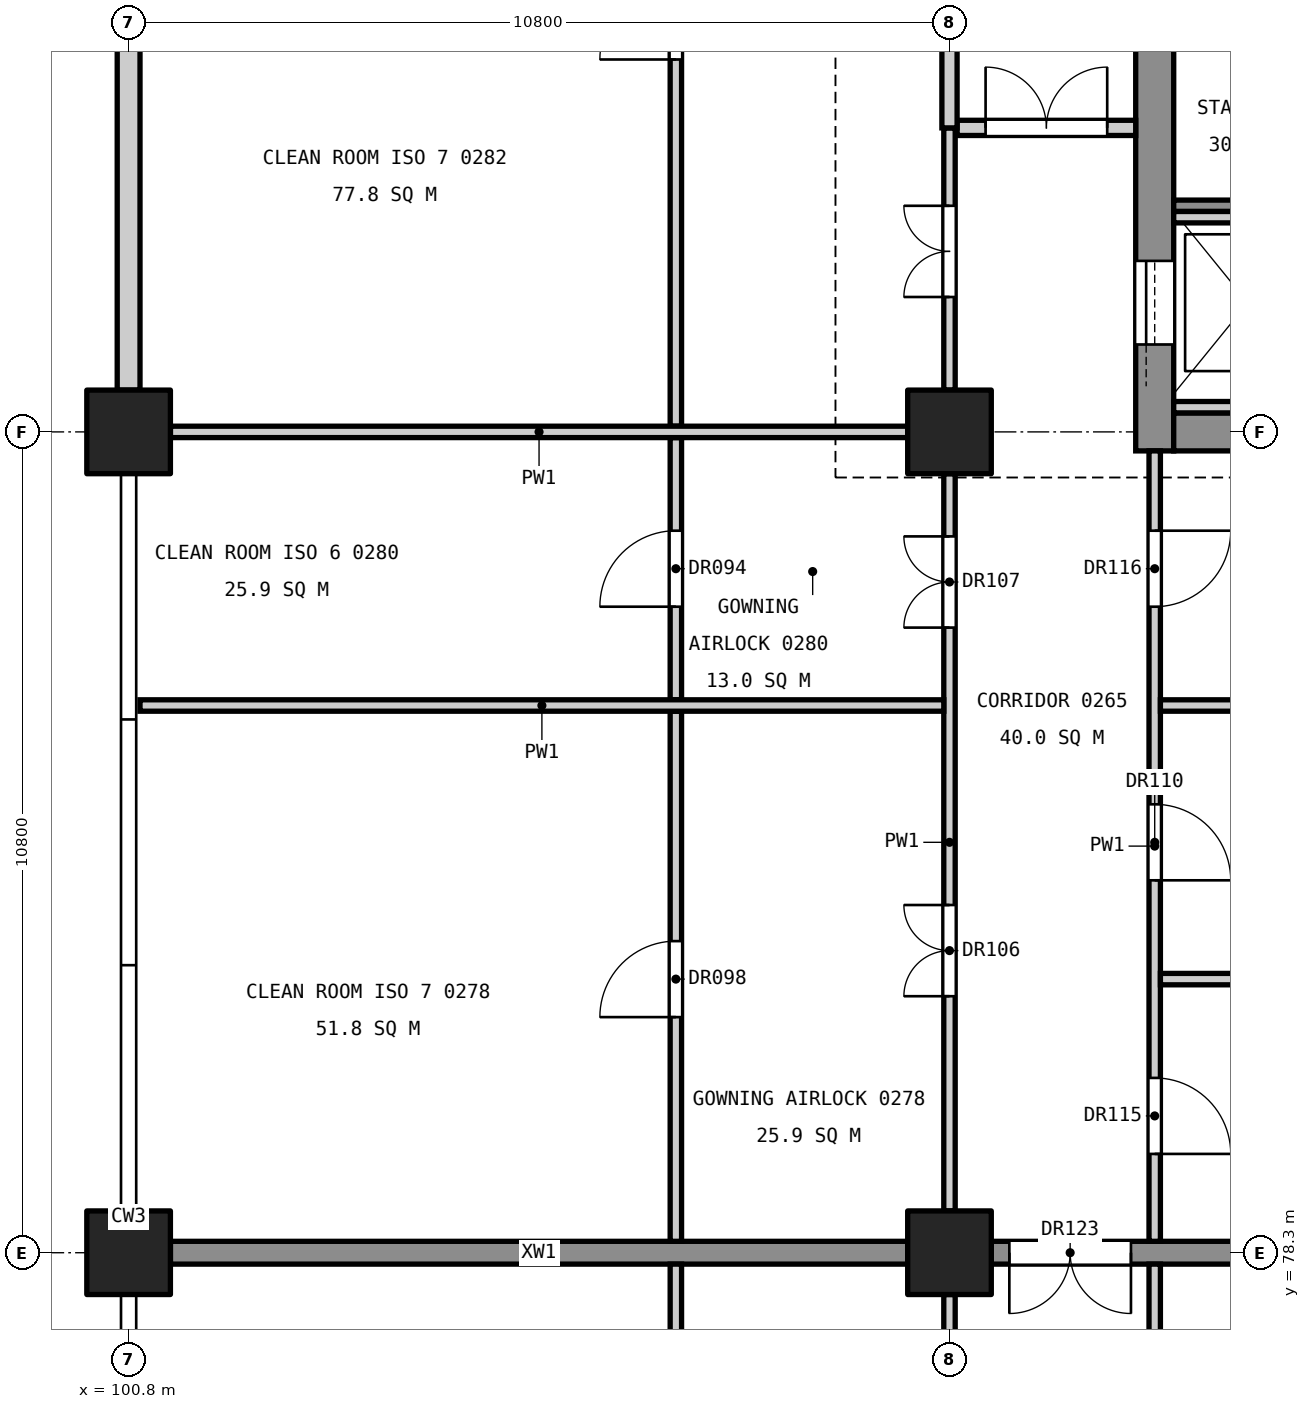
"""IFC4 building model, lengths in metres.
Left out: names, types, materials, properties, quantities, classifications, styles, units other than length and angle.
Written with IfcOpenShell. Run it as: python <this file> out.ifc"""

import sys

from ifc_helpers import new_model, si_unit, direction, frame, frame_2d, origin, origin_2d, place, context, subcontext, project, spatial, rectangle, extrude, element, fill, save


model = new_model("IFC4")
c1 = context("Model", 3, precision=1e-05, world=origin(), true_north=direction((0.0, 1.0)))
c2 = subcontext(c1, "Body", "Model", "MODEL_VIEW")
j1 = project(units=[si_unit("LENGTHUNIT", "METRE"), si_unit("PLANEANGLEUNIT", "RADIAN")], contexts=[c1])
p1 = place(None, origin())
s1 = spatial("IfcSite", under=j1, at=p1, CompositionType="ELEMENT")
p2 = place(p1, origin())
s2 = spatial("IfcBuilding", under=s1, at=p2, CompositionType="ELEMENT")
p3 = place(p2, frame((0.0, 0.0, 11.4)))
s3 = spatial("IfcBuildingStorey", under=s2, at=p3, CompositionType="ELEMENT", Elevation=11.4)
for number, where, z_axis, x_axis in (
    (1, (111.6, 78.3, 0.0), (0.0, 0.0, 1.0), (1.0, 0.0, 0.0)),
    (2, (111.6, 89.1, 0.0), (0.0, 0.0, 1.0), (1.0, 0.0, 0.0)),
    (3, (100.8, 78.3, 0.0), (0.0, 0.0, 1.0), (1.0, 0.0, 0.0)),
    (4, (100.8, 89.1, 0.0), (0.0, 0.0, 1.0), (1.0, 0.0, 0.0)),
):
    element("IfcColumn", number, at=place(p3, frame(where, z_axis=z_axis, x_axis=x_axis)), inside=s3, PredefinedType="COLUMN", context=c2, shape_type="SweptSolid", body=[
        extrude(rectangle(XDim=1.1, YDim=1.1, at=origin_2d()), origin(), (0.0, 0.0, 1.0), 5.4),
    ])
p4 = place(p3, frame((114.3, 88.85, 0.0), z_axis=(0.0, 0.0, 1.0), x_axis=(0.0, 1.0, 0.0)))
e5 = element("IfcWall", 5, at=p4, inside=s3, PredefinedType="SHEAR", context=c2, shape_type="SweptSolid", body=[
    extrude(rectangle(XDim=11.3, YDim=0.5, at=frame_2d((5.65, 0.0))), origin(), (0.0, 0.0, 1.0), 5.1),
])
p5 = place(p4, frame((9.35, 0.0, 0.0)))
e6 = element("IfcOpeningElement", 6, at=p5, cuts=e5, PredefinedType="OPENING", context=c2, shape_type="SweptSolid", body=[
    extrude(rectangle(XDim=1.4, YDim=2.1, at=frame_2d((0.7, 1.05))), frame((0.0, 0.26, 0.0), z_axis=(0.0, -1.0, 0.0), x_axis=(1.0, 0.0, 0.0)), (0.0, 0.0, 1.0), 0.52),
])
p6 = place(p4, frame((1.4, 0.0, 0.0)))
e7 = element("IfcOpeningElement", 7, at=p6, cuts=e5, PredefinedType="OPENING", context=c2, shape_type="SweptSolid", body=[
    extrude(rectangle(XDim=1.1, YDim=2.1, at=frame_2d((0.55, 1.05))), frame((0.0, 0.26, 0.0), z_axis=(0.0, -1.0, 0.0), x_axis=(1.0, 0.0, 0.0)), (0.0, 0.0, 1.0), 0.52),
])
p7 = place(p3, frame((118.55, 89.1, 0.0), z_axis=(0.0, 0.0, 1.0), x_axis=(-1.0, 0.0, 0.0)))
e8 = element("IfcWall", 8, at=p7, inside=s3, PredefinedType="SHEAR", context=c2, shape_type="SweptSolid", body=[
    extrude(rectangle(XDim=4.0, YDim=0.5, at=frame_2d((2.0, 0.0))), origin(), (0.0, 0.0, 1.0), 5.1),
])
p8 = place(p3, frame((118.25, 78.3, 0.0), z_axis=(0.0, 0.0, 1.0), x_axis=(-1.0, 0.0, 0.0)))
e9 = element("IfcWall", 9, at=p8, inside=s3, PredefinedType="SHEAR", context=c2, shape_type="SweptSolid", body=[
    extrude(rectangle(XDim=6.1, YDim=0.3, at=frame_2d((3.05, 0.0))), origin(), (0.0, 0.0, 1.0), 5.1),
])
p9 = place(p8, frame((4.262, 0.0, 0.0)))
e10 = element("IfcOpeningElement", 10, at=p9, cuts=e9, PredefinedType="OPENING", context=c2, shape_type="SweptSolid", body=[
    extrude(rectangle(XDim=1.6, YDim=2.1, at=frame_2d((0.8, 1.05))), frame((0.0, 0.16, 0.0), z_axis=(0.0, -1.0, 0.0), x_axis=(1.0, 0.0, 0.0)), (0.0, 0.0, 1.0), 0.32),
])
p10 = place(p3, frame((111.05, 78.3, 0.0), z_axis=(0.0, 0.0, 1.0), x_axis=(-1.0, 0.0, 0.0)))
e11 = element("IfcWall", 11, at=p10, inside=s3, PredefinedType="SHEAR", context=c2, shape_type="SweptSolid", body=[
    extrude(rectangle(XDim=9.7, YDim=0.3, at=frame_2d((4.85, 0.0))), origin(), (0.0, 0.0, 1.0), 5.1),
])
p11 = place(p3, frame((118.55, 92.075, 0.0), z_axis=(0.0, 0.0, 1.0), x_axis=(-1.0, 0.0, 0.0)))
e12 = element("IfcWall", 12, at=p11, inside=s3, PredefinedType="SOLIDWALL", context=c2, shape_type="SweptSolid", body=[
    extrude(rectangle(XDim=4.0, YDim=0.15, at=frame_2d((2.0, 0.0))), origin(), (0.0, 0.0, 1.0), 5.1),
])
for number, where, z_axis, x_axis in (
    (13, (116.35, 91.925, 0.0), (0.0, 0.0, 1.0), (-1.0, 0.0, 0.0)),
    (14, (116.35, 89.425, 0.0), (0.0, 0.0, 1.0), (-1.0, 0.0, 0.0)),
):
    element("IfcWall", number, at=place(p3, frame(where, z_axis=z_axis, x_axis=x_axis)), inside=s3, PredefinedType="SOLIDWALL", context=c2, shape_type="SweptSolid", body=[
        extrude(rectangle(XDim=1.8, YDim=0.15, at=frame_2d((0.9, 0.0))), origin(), (0.0, 0.0, 1.0), 5.4),
    ])
p12 = place(p3, frame((100.8, 89.65, 0.0), z_axis=(0.0, 0.0, 1.0), x_axis=(0.0, 1.0, 0.0)))
e15 = element("IfcWall", 15, at=p12, inside=s3, PredefinedType="STANDARD", context=c2, shape_type="SweptSolid", body=[
    extrude(rectangle(XDim=9.7, YDim=0.3, at=frame_2d((4.85, 0.0))), origin(), (0.0, 0.0, 1.0), 4.0),
])
p13 = place(p3, frame((114.3, 74.95, 0.0), z_axis=(0.0, 0.0, 1.0), x_axis=(0.0, 1.0, 0.0)))
e16 = element("IfcWall", 16, at=p13, inside=s3, PredefinedType="PARTITIONING", context=c2, shape_type="SweptSolid", body=[
    extrude(rectangle(XDim=3.2, YDim=0.15, at=frame_2d((1.6, 0.0))), origin(), (0.0, 0.0, 1.0), 4.0),
])
p14 = place(p13, frame((1.05, 0.0, 0.0)))
e17 = element("IfcOpeningElement", 17, at=p14, cuts=e16, PredefinedType="OPENING", context=c2, shape_type="SweptSolid", body=[
    extrude(rectangle(XDim=1.0, YDim=2.1, at=frame_2d((0.5, 1.05))), frame((0.0, 0.085, 0.0), z_axis=(0.0, -1.0, 0.0), x_axis=(1.0, 0.0, 0.0)), (0.0, 0.0, 1.0), 0.17),
])
p15 = place(p3, frame((114.3, 78.45, 0.0), z_axis=(0.0, 0.0, 1.0), x_axis=(0.0, 1.0, 0.0)))
e18 = element("IfcWall", 18, at=p15, inside=s3, PredefinedType="PARTITIONING", context=c2, shape_type="SweptSolid", body=[
    extrude(rectangle(XDim=10.4, YDim=0.15, at=frame_2d((5.2, 0.0))), origin(), (0.0, 0.0, 1.0), 4.0),
])
p16 = place(p15, frame((4.75, 0.0, 0.0)))
e19 = element("IfcOpeningElement", 19, at=p16, cuts=e18, PredefinedType="OPENING", context=c2, shape_type="SweptSolid", body=[
    extrude(rectangle(XDim=1.0, YDim=2.1, at=frame_2d((0.5, 1.05))), frame((0.0, 0.085, 0.0), z_axis=(0.0, -1.0, 0.0), x_axis=(1.0, 0.0, 0.0)), (0.0, 0.0, 1.0), 0.17),
])
p17 = place(p15, frame((1.15, 0.0, 0.0)))
e20 = element("IfcOpeningElement", 20, at=p17, cuts=e18, PredefinedType="OPENING", context=c2, shape_type="SweptSolid", body=[
    extrude(rectangle(XDim=1.0, YDim=2.1, at=frame_2d((0.5, 1.05))), frame((0.0, 0.085, 0.0), z_axis=(0.0, -1.0, 0.0), x_axis=(1.0, 0.0, 0.0)), (0.0, 0.0, 1.0), 0.17),
])
p18 = place(p15, frame((8.35, 0.0, 0.0)))
e21 = element("IfcOpeningElement", 21, at=p18, cuts=e18, PredefinedType="OPENING", context=c2, shape_type="SweptSolid", body=[
    extrude(rectangle(XDim=1.0, YDim=2.1, at=frame_2d((0.5, 1.05))), frame((0.0, 0.085, 0.0), z_axis=(0.0, -1.0, 0.0), x_axis=(1.0, 0.0, 0.0)), (0.0, 0.0, 1.0), 0.17),
])
for number, where, z_axis, x_axis in (
    (22, (118.65, 81.9, 0.0), (0.0, 0.0, 1.0), (-1.0, 0.0, 0.0)),
    (23, (118.65, 85.5, 0.0), (0.0, 0.0, 1.0), (-1.0, 0.0, 0.0)),
):
    element("IfcWall", number, at=place(p3, frame(where, z_axis=z_axis, x_axis=x_axis)), inside=s3, PredefinedType="PARTITIONING", context=c2, shape_type="SweptSolid", body=[
        extrude(rectangle(XDim=4.275, YDim=0.15, at=frame_2d((2.137, 0.0))), origin(), (0.0, 0.0, 1.0), 4.3),
    ])
p19 = place(p3, frame((114.05, 93.1, 0.0), z_axis=(0.0, 0.0, 1.0), x_axis=(-1.0, 0.0, 0.0)))
e24 = element("IfcWall", 24, at=p19, inside=s3, PredefinedType="PARTITIONING", context=c2, shape_type="SweptSolid", body=[
    extrude(rectangle(XDim=2.35, YDim=0.2, at=frame_2d((1.175, 0.0))), origin(), (0.0, 0.0, 1.0), 4.0),
])
p20 = place(p19, frame((0.375, 0.0, 0.0)))
e25 = element("IfcOpeningElement", 25, at=p20, cuts=e24, PredefinedType="OPENING", context=c2, shape_type="SweptSolid", body=[
    extrude(rectangle(XDim=1.6, YDim=2.1, at=frame_2d((0.8, 1.05))), frame((0.0, 0.11, 0.0), z_axis=(0.0, -1.0, 0.0), x_axis=(1.0, 0.0, 0.0)), (0.0, 0.0, 1.0), 0.22),
])
p21 = place(p3, frame((111.6, 70.8, 0.0), z_axis=(0.0, 0.0, 1.0), x_axis=(0.0, 1.0, 0.0)))
e26 = element("IfcWall", 26, at=p21, inside=s3, PredefinedType="PARTITIONING", context=c2, shape_type="SweptSolid", body=[
    extrude(rectangle(XDim=6.95, YDim=0.15, at=frame_2d((3.475, 0.0))), origin(), (0.0, 0.0, 1.0), 4.0),
])
p22 = place(p21, frame((2.975, 0.0, 0.0)))
e27 = element("IfcOpeningElement", 27, at=p22, cuts=e26, PredefinedType="OPENING", context=c2, shape_type="SweptSolid", body=[
    extrude(rectangle(XDim=1.2, YDim=2.1, at=frame_2d((0.6, 1.05))), frame((0.0, 0.085, 0.0), z_axis=(0.0, -1.0, 0.0), x_axis=(1.0, 0.0, 0.0)), (0.0, 0.0, 1.0), 0.17),
])
p23 = place(p3, frame((111.6, 78.85, 0.0), z_axis=(0.0, 0.0, 1.0), x_axis=(0.0, 1.0, 0.0)))
e28 = element("IfcWall", 28, at=p23, inside=s3, PredefinedType="PARTITIONING", context=c2, shape_type="SweptSolid", body=[
    extrude(rectangle(XDim=9.7, YDim=0.15, at=frame_2d((4.85, 0.0))), origin(), (0.0, 0.0, 1.0), 4.0),
])
p24 = place(p23, frame((2.825, 0.0, 0.0)))
e29 = element("IfcOpeningElement", 29, at=p24, cuts=e28, PredefinedType="OPENING", context=c2, shape_type="SweptSolid", body=[
    extrude(rectangle(XDim=1.2, YDim=2.1, at=frame_2d((0.6, 1.05))), frame((0.0, 0.085, 0.0), z_axis=(0.0, -1.0, 0.0), x_axis=(1.0, 0.0, 0.0)), (0.0, 0.0, 1.0), 0.17),
])
p25 = place(p23, frame((7.675, 0.0, 0.0)))
e30 = element("IfcOpeningElement", 30, at=p25, cuts=e28, PredefinedType="OPENING", context=c2, shape_type="SweptSolid", body=[
    extrude(rectangle(XDim=1.2, YDim=2.1, at=frame_2d((0.6, 1.05))), frame((0.0, 0.085, 0.0), z_axis=(0.0, -1.0, 0.0), x_axis=(1.0, 0.0, 0.0)), (0.0, 0.0, 1.0), 0.17),
])
p26 = place(p3, frame((111.6, 89.65, 0.0), z_axis=(0.0, 0.0, 1.0), x_axis=(0.0, 1.0, 0.0)))
e31 = element("IfcWall", 31, at=p26, inside=s3, PredefinedType="PARTITIONING", context=c2, shape_type="SweptSolid", body=[
    extrude(rectangle(XDim=3.45, YDim=0.15, at=frame_2d((1.725, 0.0))), origin(), (0.0, 0.0, 1.0), 4.0),
])
p27 = place(p26, frame((1.225, 0.0, 0.0)))
e32 = element("IfcOpeningElement", 32, at=p27, cuts=e31, PredefinedType="OPENING", context=c2, shape_type="SweptSolid", body=[
    extrude(rectangle(XDim=1.2, YDim=2.1, at=frame_2d((0.6, 1.05))), frame((0.0, 0.085, 0.0), z_axis=(0.0, -1.0, 0.0), x_axis=(1.0, 0.0, 0.0)), (0.0, 0.0, 1.0), 0.17),
])
p28 = place(p3, frame((111.6, 93.1, 0.0), z_axis=(0.0, 0.0, 1.0), x_axis=(0.0, 1.0, 0.0)))
e33 = element("IfcWall", 33, at=p28, inside=s3, PredefinedType="PARTITIONING", context=c2, shape_type="SweptSolid", body=[
    extrude(rectangle(XDim=6.25, YDim=0.2, at=frame_2d((3.125, 0.0))), origin(), (0.0, 0.0, 1.0), 4.0),
])
p29 = place(p3, frame((108.0, 63.975, 0.0), z_axis=(0.0, 0.0, 1.0), x_axis=(0.0, 1.0, 0.0)))
e34 = element("IfcWall", 34, at=p29, inside=s3, PredefinedType="PARTITIONING", context=c2, shape_type="SweptSolid", body=[
    extrude(rectangle(XDim=14.175, YDim=0.15, at=frame_2d((7.087, 0.0))), origin(), (0.0, 0.0, 1.0), 4.0),
])
p30 = place(p29, frame((6.625, 0.0, 0.0)))
e35 = element("IfcOpeningElement", 35, at=p30, cuts=e34, PredefinedType="OPENING", context=c2, shape_type="SweptSolid", body=[
    extrude(rectangle(XDim=1.0, YDim=2.1, at=frame_2d((0.5, 1.05))), frame((0.0, 0.085, 0.0), z_axis=(0.0, -1.0, 0.0), x_axis=(1.0, 0.0, 0.0)), (0.0, 0.0, 1.0), 0.17),
])
p31 = place(p3, frame((108.0, 78.45, 0.0), z_axis=(0.0, 0.0, 1.0), x_axis=(0.0, 1.0, 0.0)))
e36 = element("IfcWall", 36, at=p31, inside=s3, PredefinedType="PARTITIONING", context=c2, shape_type="SweptSolid", body=[
    extrude(rectangle(XDim=6.975, YDim=0.15, at=frame_2d((3.488, 0.0))), origin(), (0.0, 0.0, 1.0), 4.0),
])
p32 = place(p31, frame((2.95, 0.0, 0.0)))
e37 = element("IfcOpeningElement", 37, at=p32, cuts=e36, PredefinedType="OPENING", context=c2, shape_type="SweptSolid", body=[
    extrude(rectangle(XDim=1.0, YDim=2.1, at=frame_2d((0.5, 1.05))), frame((0.0, 0.085, 0.0), z_axis=(0.0, -1.0, 0.0), x_axis=(1.0, 0.0, 0.0)), (0.0, 0.0, 1.0), 0.17),
])
p33 = place(p3, frame((108.0, 85.575, 0.0), z_axis=(0.0, 0.0, 1.0), x_axis=(0.0, 1.0, 0.0)))
e38 = element("IfcWall", 38, at=p33, inside=s3, PredefinedType="PARTITIONING", context=c2, shape_type="SweptSolid", body=[
    extrude(rectangle(XDim=3.45, YDim=0.15, at=frame_2d((1.725, 0.0))), origin(), (0.0, 0.0, 1.0), 4.0),
])
p34 = place(p33, frame((1.225, 0.0, 0.0)))
e39 = element("IfcOpeningElement", 39, at=p34, cuts=e38, PredefinedType="OPENING", context=c2, shape_type="SweptSolid", body=[
    extrude(rectangle(XDim=1.0, YDim=2.1, at=frame_2d((0.5, 1.05))), frame((0.0, 0.085, 0.0), z_axis=(0.0, -1.0, 0.0), x_axis=(1.0, 0.0, 0.0)), (0.0, 0.0, 1.0), 0.17),
])
p35 = place(p3, frame((108.0, 89.175, 0.0), z_axis=(0.0, 0.0, 1.0), x_axis=(0.0, 1.0, 0.0)))
e40 = element("IfcWall", 40, at=p35, inside=s3, PredefinedType="PARTITIONING", context=c2, shape_type="SweptSolid", body=[
    extrude(rectangle(XDim=10.575, YDim=0.15, at=frame_2d((5.288, 0.0))), origin(), (0.0, 0.0, 1.0), 4.0),
])
p36 = place(p35, frame((4.825, 0.0, 0.0)))
e41 = element("IfcOpeningElement", 41, at=p36, cuts=e40, PredefinedType="OPENING", context=c2, shape_type="SweptSolid", body=[
    extrude(rectangle(XDim=1.0, YDim=2.1, at=frame_2d((0.5, 1.05))), frame((0.0, 0.085, 0.0), z_axis=(0.0, -1.0, 0.0), x_axis=(1.0, 0.0, 0.0)), (0.0, 0.0, 1.0), 0.17),
])
p37 = place(p3, frame((111.525, 85.5, 0.0), z_axis=(0.0, 0.0, 1.0), x_axis=(-1.0, 0.0, 0.0)))
e42 = element("IfcWall", 42, at=p37, inside=s3, PredefinedType="PARTITIONING", context=c2, shape_type="SweptSolid", body=[
    extrude(rectangle(XDim=10.575, YDim=0.15, at=frame_2d((5.288, 0.0))), origin(), (0.0, 0.0, 1.0), 4.3),
])
p38 = place(p3, frame((111.05, 89.1, 0.0), z_axis=(0.0, 0.0, 1.0), x_axis=(-1.0, 0.0, 0.0)))
e43 = element("IfcWall", 43, at=p38, inside=s3, PredefinedType="PARTITIONING", context=c2, shape_type="SweptSolid", body=[
    extrude(rectangle(XDim=9.7, YDim=0.15, at=frame_2d((4.85, 0.0))), origin(), (0.0, 0.0, 1.0), 4.3),
])
p39 = place(p6, origin())
e44 = element("IfcDoor", 44, at=p39, inside=s3, OperationType="SLIDING_TO_LEFT", PredefinedType="DOOR", context=c2, shape_type="SweptSolid", body=[
    extrude(rectangle(XDim=1.1, YDim=2.1, at=frame_2d((0.55, 1.05))), frame((0.0, 0.025, 0.0), z_axis=(0.0, -1.0, 0.0), x_axis=(1.0, 0.0, 0.0)), (0.0, 0.0, 1.0), 0.05),
])
fill(e7, e44)
p40 = place(p34, origin())
e45 = element("IfcDoor", 45, at=p40, inside=s3, OperationType="SINGLE_SWING_LEFT", PredefinedType="DOOR", context=c2, shape_type="SweptSolid", body=[
    extrude(rectangle(XDim=1.0, YDim=2.1, at=frame_2d((0.5, 1.05))), frame((0.0, 0.025, 0.0), z_axis=(0.0, -1.0, 0.0), x_axis=(1.0, 0.0, 0.0)), (0.0, 0.0, 1.0), 0.05),
])
fill(e39, e45)
p41 = place(p32, origin())
e46 = element("IfcDoor", 46, at=p41, inside=s3, OperationType="SINGLE_SWING_LEFT", PredefinedType="DOOR", context=c2, shape_type="SweptSolid", body=[
    extrude(rectangle(XDim=1.0, YDim=2.1, at=frame_2d((0.5, 1.05))), frame((0.0, 0.025, 0.0), z_axis=(0.0, -1.0, 0.0), x_axis=(1.0, 0.0, 0.0)), (0.0, 0.0, 1.0), 0.05),
])
fill(e37, e46)
p42 = place(p36, origin())
e47 = element("IfcDoor", 47, at=p42, inside=s3, OperationType="SINGLE_SWING_LEFT", PredefinedType="DOOR", context=c2, shape_type="SweptSolid", body=[
    extrude(rectangle(XDim=1.0, YDim=2.1, at=frame_2d((0.5, 1.05))), frame((0.0, 0.025, 0.0), z_axis=(0.0, -1.0, 0.0), x_axis=(1.0, 0.0, 0.0)), (0.0, 0.0, 1.0), 0.05),
])
fill(e41, e47)
p43 = place(p24, origin())
e48 = element("IfcDoor", 48, at=p43, inside=s3, OperationType="DOUBLE_DOOR_SINGLE_SWING", PredefinedType="DOOR", context=c2, shape_type="SweptSolid", body=[
    extrude(rectangle(XDim=1.2, YDim=2.1, at=frame_2d((0.6, 1.05))), frame((0.0, 0.025, 0.0), z_axis=(0.0, -1.0, 0.0), x_axis=(1.0, 0.0, 0.0)), (0.0, 0.0, 1.0), 0.05),
])
fill(e29, e48)
p44 = place(p25, origin())
e49 = element("IfcDoor", 49, at=p44, inside=s3, OperationType="DOUBLE_DOOR_SINGLE_SWING", PredefinedType="DOOR", context=c2, shape_type="SweptSolid", body=[
    extrude(rectangle(XDim=1.2, YDim=2.1, at=frame_2d((0.6, 1.05))), frame((0.0, 0.025, 0.0), z_axis=(0.0, -1.0, 0.0), x_axis=(1.0, 0.0, 0.0)), (0.0, 0.0, 1.0), 0.05),
])
fill(e30, e49)
p45 = place(p27, origin())
e50 = element("IfcDoor", 50, at=p45, inside=s3, OperationType="DOUBLE_DOOR_SINGLE_SWING", PredefinedType="DOOR", context=c2, shape_type="SweptSolid", body=[
    extrude(rectangle(XDim=1.2, YDim=2.1, at=frame_2d((0.6, 1.05))), frame((0.0, 0.025, 0.0), z_axis=(0.0, -1.0, 0.0), x_axis=(1.0, 0.0, 0.0)), (0.0, 0.0, 1.0), 0.05),
])
fill(e32, e50)
p46 = place(p16, frame((1.0, 0.0, 0.0), z_axis=(0.0, 0.0, 1.0), x_axis=(-1.0, 0.0, 0.0)))
e51 = element("IfcDoor", 51, at=p46, inside=s3, OperationType="SINGLE_SWING_RIGHT", PredefinedType="DOOR", context=c2, shape_type="SweptSolid", body=[
    extrude(rectangle(XDim=1.0, YDim=2.1, at=frame_2d((0.5, 1.05))), frame((0.0, 0.025, 0.0), z_axis=(0.0, -1.0, 0.0), x_axis=(1.0, 0.0, 0.0)), (0.0, 0.0, 1.0), 0.05),
])
fill(e19, e51)
p47 = place(p17, frame((1.0, 0.0, 0.0), z_axis=(0.0, 0.0, 1.0), x_axis=(-1.0, 0.0, 0.0)))
e52 = element("IfcDoor", 52, at=p47, inside=s3, OperationType="SINGLE_SWING_RIGHT", PredefinedType="DOOR", context=c2, shape_type="SweptSolid", body=[
    extrude(rectangle(XDim=1.0, YDim=2.1, at=frame_2d((0.5, 1.05))), frame((0.0, 0.025, 0.0), z_axis=(0.0, -1.0, 0.0), x_axis=(1.0, 0.0, 0.0)), (0.0, 0.0, 1.0), 0.05),
])
fill(e20, e52)
p48 = place(p18, frame((1.0, 0.0, 0.0), z_axis=(0.0, 0.0, 1.0), x_axis=(-1.0, 0.0, 0.0)))
e53 = element("IfcDoor", 53, at=p48, inside=s3, OperationType="SINGLE_SWING_LEFT", PredefinedType="DOOR", context=c2, shape_type="SweptSolid", body=[
    extrude(rectangle(XDim=1.0, YDim=2.1, at=frame_2d((0.5, 1.05))), frame((0.0, 0.025, 0.0), z_axis=(0.0, -1.0, 0.0), x_axis=(1.0, 0.0, 0.0)), (0.0, 0.0, 1.0), 0.05),
])
fill(e21, e53)
p49 = place(p20, frame((1.6, 0.0, 0.0), z_axis=(0.0, 0.0, 1.0), x_axis=(-1.0, 0.0, 0.0)))
e54 = element("IfcDoor", 54, at=p49, inside=s3, OperationType="DOUBLE_DOOR_SINGLE_SWING", PredefinedType="DOOR", context=c2, shape_type="SweptSolid", body=[
    extrude(rectangle(XDim=1.6, YDim=2.1, at=frame_2d((0.8, 1.05))), frame((0.0, 0.025, 0.0), z_axis=(0.0, -1.0, 0.0), x_axis=(1.0, 0.0, 0.0)), (0.0, 0.0, 1.0), 0.05),
])
fill(e25, e54)
p50 = place(p9, origin())
e55 = element("IfcDoor", 55, at=p50, inside=s3, OperationType="DOUBLE_DOOR_SINGLE_SWING", PredefinedType="DOOR", context=c2, shape_type="SweptSolid", body=[
    extrude(rectangle(XDim=1.6, YDim=2.1, at=frame_2d((0.8, 1.05))), frame((0.0, 0.025, 0.0), z_axis=(0.0, -1.0, 0.0), x_axis=(1.0, 0.0, 0.0)), (0.0, 0.0, 1.0), 0.05),
])
fill(e10, e55)
save(model, sys.argv[1])
